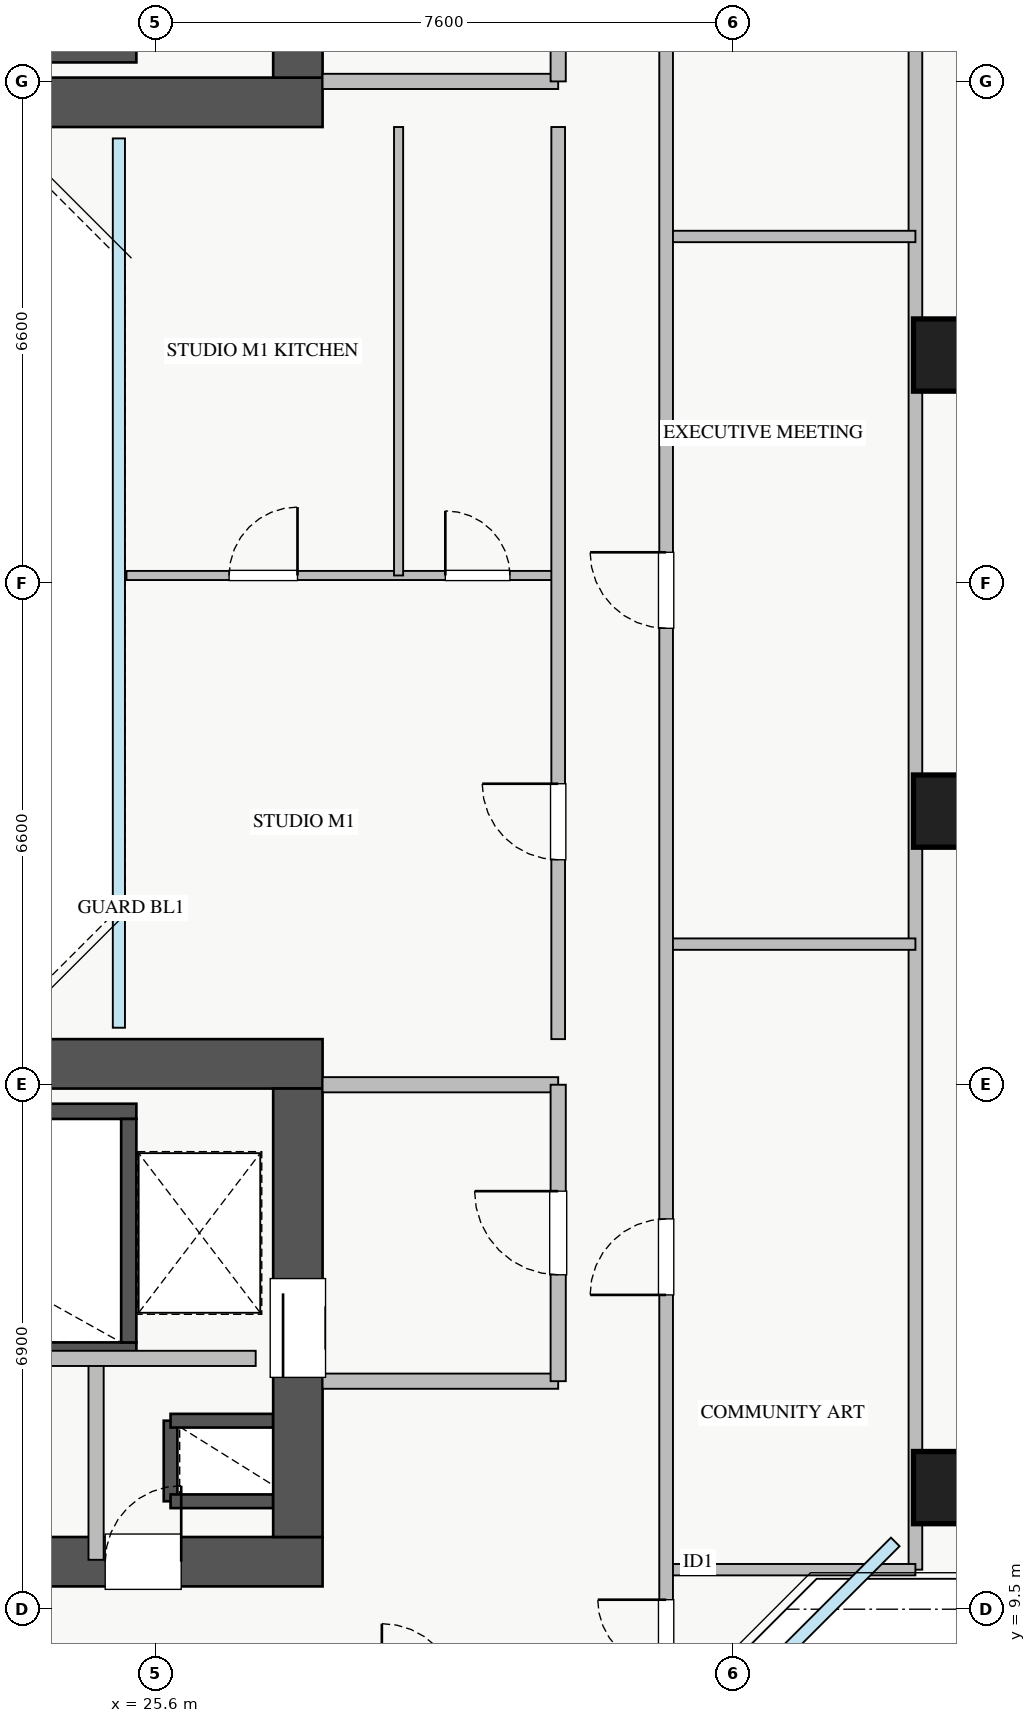
"""IFC4 building model, lengths in metres.
Left out: names, types, materials, properties, quantities, classifications, styles, units other than length and angle.
Written with IfcOpenShell. Run it as: python <this file> out.ifc"""

import sys

from ifc_helpers import new_model, si_unit, direction, frame, frame_2d, origin, origin_2d, place, context, subcontext, project, spatial, rectangle, extrude, source, transform, mapped, element, fill, save


model = new_model("IFC4")
c1 = context("Model", 3, precision=1e-05, world=origin(), true_north=direction((0.0, 1.0)))
c2 = subcontext(c1, "Body", "Model", "MODEL_VIEW")
j1 = project(units=[si_unit("LENGTHUNIT", "METRE"), si_unit("PLANEANGLEUNIT", "RADIAN")], contexts=[c1])
p1 = place(None, origin())
s1 = spatial("IfcSite", under=j1, at=p1, CompositionType="ELEMENT")
p2 = place(p1, origin())
s2 = spatial("IfcBuilding", under=s1, at=p2, CompositionType="ELEMENT")
p3 = place(p2, frame((0.0, 0.0, 176.25)))
s3 = spatial("IfcBuildingStorey", under=s2, at=p3, CompositionType="ELEMENT", Elevation=176.25)
p4 = place(p3, frame((25.8, 10.92, 0.0), z_axis=(0.0, 0.0, 1.0), x_axis=(0.0, 1.0, 0.0)))
e1 = element("IfcWall", 1, at=p4, inside=s3, PredefinedType="SHEAR", context=c2, shape_type="SweptSolid", body=[
    extrude(rectangle(XDim=1.06, YDim=0.18, at=frame_2d((0.53, 0.0))), origin(), (0.0, 0.0, 1.0), 3.07),
])
for number, where, z_axis, x_axis in (
    (2, (25.8, 11.98, 0.0), (0.0, 0.0, 1.0), (1.0, 0.0, 0.0)),
    (3, (25.8, 10.92, 0.0), (0.0, 0.0, 1.0), (1.0, 0.0, 0.0)),
):
    element("IfcWall", number, at=place(p3, frame(where, z_axis=z_axis, x_axis=x_axis)), inside=s3, PredefinedType="SHEAR", context=c2, shape_type="SweptSolid", body=[
        extrude(rectangle(XDim=1.35, YDim=0.18, at=frame_2d((0.675, 0.0))), origin(), (0.0, 0.0, 1.0), 3.07),
    ])
p5 = place(p3, frame((18.2, 29.95, 0.0), z_axis=(0.0, 0.0, 1.0), x_axis=(1.0, 0.0, 0.0)))
e4 = element("IfcWall", 4, at=p5, inside=s3, PredefinedType="SHEAR", context=c2, shape_type="SweptSolid", body=[
    extrude(rectangle(XDim=7.15, YDim=0.2, at=frame_2d((3.575, 0.0))), origin(), (0.0, 0.0, 1.0), 3.25),
])
p6 = place(p3, frame((18.2, 12.91, 0.0), z_axis=(0.0, 0.0, 1.0), x_axis=(1.0, 0.0, 0.0)))
e5 = element("IfcWall", 5, at=p6, inside=s3, PredefinedType="SHEAR", context=c2, shape_type="SweptSolid", body=[
    extrude(rectangle(XDim=7.15, YDim=0.2, at=frame_2d((3.575, 0.0))), origin(), (0.0, 0.0, 1.0), 3.25),
])
p7 = place(p6, frame((0.35, 0.0, 0.0)))
e6 = element("IfcOpeningElement", 6, at=p7, cuts=e5, PredefinedType="OPENING", context=c2, shape_type="SweptSolid", body=[
    extrude(rectangle(XDim=1.1, YDim=2.05, at=frame_2d((0.55, 1.025))), frame((0.0, 0.11, 0.0), z_axis=(0.0, -1.0, 0.0), x_axis=(1.0, 0.0, 0.0)), (0.0, 0.0, 1.0), 0.22),
])
p8 = place(p3, frame((18.2, 16.05, 0.0), z_axis=(0.0, 0.0, 1.0), x_axis=(1.0, 0.0, 0.0)))
e7 = element("IfcWall", 7, at=p8, inside=s3, PredefinedType="SHEAR", context=c2, shape_type="SweptSolid", body=[
    extrude(rectangle(XDim=7.15, YDim=0.2, at=frame_2d((3.575, 0.0))), origin(), (0.0, 0.0, 1.0), 3.25),
])
p9 = place(p3, frame((25.25, 13.01, 0.0), z_axis=(0.0, 0.0, 1.0), x_axis=(0.0, 1.0, 0.0)))
e8 = element("IfcWall", 8, at=p9, inside=s3, PredefinedType="SHEAR", context=c2, shape_type="SweptSolid", body=[
    extrude(rectangle(XDim=2.94, YDim=0.2, at=frame_2d((1.47, 0.0))), origin(), (0.0, 0.0, 1.0), 3.25),
])
p10 = place(p3, frame((10.2, 29.325, 0.0), z_axis=(0.0, 0.0, 1.0), x_axis=(1.0, 0.0, 0.0)))
e9 = element("IfcWall", 9, at=p10, inside=s3, PredefinedType="SHEAR", context=c2, shape_type="SweptSolid", body=[
    extrude(rectangle(XDim=17.6, YDim=0.65, at=frame_2d((8.8, 0.0))), origin(), (0.0, 0.0, 1.0), 3.25),
])
p11 = place(p3, frame((27.475, 29.65, 0.0), z_axis=(0.0, 0.0, 1.0), x_axis=(0.0, 1.0, 0.0)))
e10 = element("IfcWall", 10, at=p11, inside=s3, PredefinedType="SHEAR", context=c2, shape_type="SweptSolid", body=[
    extrude(rectangle(XDim=5.9, YDim=0.65, at=frame_2d((2.95, 0.0))), origin(), (0.0, 0.0, 1.0), 3.25),
])
p12 = place(p11, frame((1.1, 0.0, 0.0)))
e11 = element("IfcOpeningElement", 11, at=p12, cuts=e10, PredefinedType="OPENING", context=c2, shape_type="SweptSolid", body=[
    extrude(rectangle(XDim=1.3, YDim=2.05, at=frame_2d((0.65, 1.025))), frame((0.0, 0.335, 0.0), z_axis=(0.0, -1.0, 0.0), x_axis=(1.0, 0.0, 0.0)), (0.0, 0.0, 1.0), 0.67),
])
p13 = place(p3, frame((10.2, 10.125, 0.0), z_axis=(0.0, 0.0, 1.0), x_axis=(1.0, 0.0, 0.0)))
e12 = element("IfcWall", 12, at=p13, inside=s3, PredefinedType="SHEAR", context=c2, shape_type="SweptSolid", body=[
    extrude(rectangle(XDim=17.6, YDim=0.65, at=frame_2d((8.8, 0.0))), origin(), (0.0, 0.0, 1.0), 3.25),
])
p14 = place(p13, frame((1.15, 0.0, 0.0)))
e13 = element("IfcOpeningElement", 13, at=p14, cuts=e12, PredefinedType="OPENING", context=c2, shape_type="SweptSolid", body=[
    extrude(rectangle(XDim=1.1, YDim=2.05, at=frame_2d((0.55, 1.025))), frame((0.0, 0.335, 0.0), z_axis=(0.0, -1.0, 0.0), x_axis=(1.0, 0.0, 0.0)), (0.0, 0.0, 1.0), 0.67),
])
p15 = place(p13, frame((8.3, 0.0, 0.0)))
e14 = element("IfcOpeningElement", 14, at=p15, cuts=e12, PredefinedType="OPENING", context=c2, shape_type="SweptSolid", body=[
    extrude(rectangle(XDim=1.1, YDim=2.05, at=frame_2d((0.55, 1.025))), frame((0.0, 0.335, 0.0), z_axis=(0.0, -1.0, 0.0), x_axis=(1.0, 0.0, 0.0)), (0.0, 0.0, 1.0), 0.67),
])
p16 = place(p13, frame((4.9, 0.0, 0.0)))
e15 = element("IfcOpeningElement", 15, at=p16, cuts=e12, PredefinedType="OPENING", context=c2, shape_type="SweptSolid", body=[
    extrude(rectangle(XDim=1.1, YDim=2.05, at=frame_2d((0.55, 1.025))), frame((0.0, 0.335, 0.0), z_axis=(0.0, -1.0, 0.0), x_axis=(1.0, 0.0, 0.0)), (0.0, 0.0, 1.0), 0.67),
])
p17 = place(p13, frame((14.74, 0.0, 0.0)))
e16 = element("IfcOpeningElement", 16, at=p17, cuts=e12, PredefinedType="OPENING", context=c2, shape_type="SweptSolid", body=[
    extrude(rectangle(XDim=1.0, YDim=2.05, at=frame_2d((0.5, 1.025))), frame((0.0, 0.335, 0.0), z_axis=(0.0, -1.0, 0.0), x_axis=(1.0, 0.0, 0.0)), (0.0, 0.0, 1.0), 0.67),
])
p18 = place(p13, frame((11.67, 0.0, 0.0)))
e17 = element("IfcOpeningElement", 17, at=p18, cuts=e12, PredefinedType="OPENING", context=c2, shape_type="SweptSolid", body=[
    extrude(rectangle(XDim=1.0, YDim=2.05, at=frame_2d((0.5, 1.025))), frame((0.0, 0.335, 0.0), z_axis=(0.0, -1.0, 0.0), x_axis=(1.0, 0.0, 0.0)), (0.0, 0.0, 1.0), 0.67),
])
p19 = place(p3, frame((10.2, 16.675, 0.0), z_axis=(0.0, 0.0, 1.0), x_axis=(1.0, 0.0, 0.0)))
e18 = element("IfcWall", 18, at=p19, inside=s3, PredefinedType="SHEAR", context=c2, shape_type="SweptSolid", body=[
    extrude(rectangle(XDim=17.6, YDim=0.65, at=frame_2d((8.8, 0.0))), origin(), (0.0, 0.0, 1.0), 3.25),
])
p20 = place(p3, frame((27.475, 10.45, 0.0), z_axis=(0.0, 0.0, 1.0), x_axis=(0.0, 1.0, 0.0)))
e19 = element("IfcWall", 19, at=p20, inside=s3, PredefinedType="SHEAR", context=c2, shape_type="SweptSolid", body=[
    extrude(rectangle(XDim=5.9, YDim=0.65, at=frame_2d((2.95, 0.0))), origin(), (0.0, 0.0, 1.0), 3.25),
])
p21 = place(p20, frame((2.1, 0.0, 0.0)))
e20 = element("IfcOpeningElement", 20, at=p21, cuts=e19, PredefinedType="OPENING", context=c2, shape_type="SweptSolid", body=[
    extrude(rectangle(XDim=1.3, YDim=2.05, at=frame_2d((0.65, 1.025))), frame((0.0, 0.335, 0.0), z_axis=(0.0, -1.0, 0.0), x_axis=(1.0, 0.0, 0.0)), (0.0, 0.0, 1.0), 0.67),
])
m1 = source(origin(), c2, "Body", "SweptSolid", [
    extrude(rectangle(XDim=0.95, YDim=0.95, at=origin_2d()), origin(), (0.0, 0.0, 1.0), 3.25),
])
for number, where, z_axis, x_axis in (
    (21, (36.05, 11.1, 0.0), (0.0, 0.0, 1.0), (1.0, 0.0, 0.0)),
    (22, (36.05, 20.0, 0.0), (0.0, 0.0, 1.0), (1.0, 0.0, 0.0)),
    (23, (36.05, 26.0, 0.0), (0.0, 0.0, 1.0), (1.0, 0.0, 0.0)),
):
    element("IfcColumn", number, at=place(p3, frame(where, z_axis=z_axis, x_axis=x_axis)), inside=s3, PredefinedType="COLUMN", context=c2, shape_type="MappedRepresentation", body=[
        mapped(m1, transform((0.0, 0.0, 0.0), x_axis=(1.0, 0.0, 0.0), y_axis=(0.0, 1.0, 0.0), z_axis=(0.0, 0.0, 1.0), scale=1.0)),
    ])
p22 = place(p3, frame((27.8, 29.6, 0.0), z_axis=(0.0, 0.0, 1.0), x_axis=(1.0, 0.0, 0.0)))
e24 = element("IfcWall", 24, at=p22, inside=s3, PredefinedType="PARTITIONING", context=c2, shape_type="SweptSolid", body=[
    extrude(rectangle(XDim=3.1, YDim=0.2, at=frame_2d((1.55, 0.0))), origin(), (0.0, 0.0, 1.0), 3.07),
])
p23 = place(p3, frame((30.9, 29.6, 0.0), z_axis=(0.0, 0.0, 1.0), x_axis=(0.0, 1.0, 0.0)))
e25 = element("IfcWall", 25, at=p23, inside=s3, PredefinedType="PARTITIONING", context=c2, shape_type="SweptSolid", body=[
    extrude(rectangle(XDim=3.9, YDim=0.2, at=frame_2d((1.95, 0.0))), origin(), (0.0, 0.0, 1.0), 3.07),
])
p24 = place(p23, frame((1.4, 0.0, 0.0)))
e26 = element("IfcOpeningElement", 26, at=p24, cuts=e25, PredefinedType="OPENING", context=c2, shape_type="SweptSolid", body=[
    extrude(rectangle(XDim=1.1, YDim=2.05, at=frame_2d((0.55, 1.025))), frame((0.0, 0.11, 0.0), z_axis=(0.0, -1.0, 0.0), x_axis=(1.0, 0.0, 0.0)), (0.0, 0.0, 1.0), 0.22),
])
for number, where, z_axis, x_axis in (
    (27, (27.8, 16.4, 0.0), (0.0, 0.0, 1.0), (1.0, 0.0, 0.0)),
    (28, (27.8, 12.5, 0.0), (0.0, 0.0, 1.0), (1.0, 0.0, 0.0)),
):
    element("IfcWall", number, at=place(p3, frame(where, z_axis=z_axis, x_axis=x_axis)), inside=s3, PredefinedType="PARTITIONING", context=c2, shape_type="SweptSolid", body=[
        extrude(rectangle(XDim=3.1, YDim=0.2, at=frame_2d((1.55, 0.0))), origin(), (0.0, 0.0, 1.0), 3.07),
    ])
p25 = place(p3, frame((30.9, 12.5, 0.0), z_axis=(0.0, 0.0, 1.0), x_axis=(0.0, 1.0, 0.0)))
e29 = element("IfcWall", 29, at=p25, inside=s3, PredefinedType="PARTITIONING", context=c2, shape_type="SweptSolid", body=[
    extrude(rectangle(XDim=3.9, YDim=0.2, at=frame_2d((1.95, 0.0))), origin(), (0.0, 0.0, 1.0), 3.07),
])
p26 = place(p25, frame((1.4, 0.0, 0.0)))
e30 = element("IfcOpeningElement", 30, at=p26, cuts=e29, PredefinedType="OPENING", context=c2, shape_type="SweptSolid", body=[
    extrude(rectangle(XDim=1.1, YDim=2.05, at=frame_2d((0.55, 1.025))), frame((0.0, 0.11, 0.0), z_axis=(0.0, -1.0, 0.0), x_axis=(1.0, 0.0, 0.0)), (0.0, 0.0, 1.0), 0.22),
])
p27 = place(p3, frame((24.82, 10.15, 0.0), z_axis=(0.0, 0.0, 1.0), x_axis=(0.0, 1.0, 0.0)))
e31 = element("IfcWall", 31, at=p27, inside=s3, PredefinedType="PARTITIONING", context=c2, shape_type="SweptSolid", body=[
    extrude(rectangle(XDim=2.65, YDim=0.2, at=frame_2d((1.325, 0.0))), origin(), (0.0, 0.0, 1.0), 3.07),
])
p28 = place(p3, frame((21.75, 12.8, 0.0), z_axis=(0.0, 0.0, 1.0), x_axis=(1.0, 0.0, 0.0)))
e32 = element("IfcWall", 32, at=p28, inside=s3, PredefinedType="PARTITIONING", context=c2, shape_type="SweptSolid", body=[
    extrude(rectangle(XDim=5.17, YDim=0.2, at=frame_2d((2.585, 0.0))), origin(), (0.0, 0.0, 1.0), 3.07),
])
p29 = place(p3, frame((35.6, 10.02, 0.0), z_axis=(0.0, 0.0, 1.0), x_axis=(0.0, 1.0, 0.0)))
e33 = element("IfcWall", 33, at=p29, inside=s3, PredefinedType="PARTITIONING", context=c2, shape_type="SweptSolid", body=[
    extrude(rectangle(XDim=25.96, YDim=0.18, at=frame_2d((12.98, 0.0))), origin(), (0.0, 0.0, 1.0), 3.07),
])
p30 = place(p3, frame((32.32, 10.02, 0.0), z_axis=(0.0, 0.0, 1.0), x_axis=(1.0, 0.0, 0.0)))
e34 = element("IfcWall", 34, at=p30, inside=s3, PredefinedType="PARTITIONING", context=c2, shape_type="SweptSolid", body=[
    extrude(rectangle(XDim=3.28, YDim=0.15, at=frame_2d((1.64, 0.0))), origin(), (0.0, 0.0, 1.0), 3.07),
])
p31 = place(p3, frame((32.32, 18.25, 0.0), z_axis=(0.0, 0.0, 1.0), x_axis=(1.0, 0.0, 0.0)))
e35 = element("IfcWall", 35, at=p31, inside=s3, PredefinedType="PARTITIONING", context=c2, shape_type="SweptSolid", body=[
    extrude(rectangle(XDim=3.28, YDim=0.15, at=frame_2d((1.64, 0.0))), origin(), (0.0, 0.0, 1.0), 2.715),
])
p32 = place(p3, frame((32.32, 27.56, 0.0), z_axis=(0.0, 0.0, 1.0), x_axis=(1.0, 0.0, 0.0)))
e36 = element("IfcWall", 36, at=p32, inside=s3, PredefinedType="PARTITIONING", context=c2, shape_type="SweptSolid", body=[
    extrude(rectangle(XDim=3.28, YDim=0.15, at=frame_2d((1.64, 0.0))), origin(), (0.0, 0.0, 1.0), 3.07),
])
p33 = place(p3, frame((32.32, 8.31, 0.0), z_axis=(0.0, 0.0, 1.0), x_axis=(0.0, 1.0, 0.0)))
e37 = element("IfcWall", 37, at=p33, inside=s3, PredefinedType="PARTITIONING", context=c2, shape_type="SweptSolid", body=[
    extrude(rectangle(XDim=29.34, YDim=0.18, at=frame_2d((14.67, 0.0))), origin(), (0.0, 0.0, 1.0), 3.07),
])
p34 = place(p33, frame((28.045, 0.0, 0.0)))
e38 = element("IfcOpeningElement", 38, at=p34, cuts=e37, PredefinedType="OPENING", context=c2, shape_type="SweptSolid", body=[
    extrude(rectangle(XDim=0.9, YDim=2.05, at=frame_2d((0.45, 1.025))), frame((0.0, 0.1, 0.0), z_axis=(0.0, -1.0, 0.0), x_axis=(1.0, 0.0, 0.0)), (0.0, 0.0, 1.0), 0.2),
])
p35 = place(p33, frame((0.415, 0.0, 0.0)))
e39 = element("IfcOpeningElement", 39, at=p35, cuts=e37, PredefinedType="OPENING", context=c2, shape_type="SweptSolid", body=[
    extrude(rectangle(XDim=0.9, YDim=2.05, at=frame_2d((0.45, 1.025))), frame((0.0, 0.1, 0.0), z_axis=(0.0, -1.0, 0.0), x_axis=(1.0, 0.0, 0.0)), (0.0, 0.0, 1.0), 0.2),
])
p36 = place(p33, frame((5.325, 0.0, 0.0)))
e40 = element("IfcOpeningElement", 40, at=p36, cuts=e37, PredefinedType="OPENING", context=c2, shape_type="SweptSolid", body=[
    extrude(rectangle(XDim=1.0, YDim=2.05, at=frame_2d((0.5, 1.025))), frame((0.0, 0.1, 0.0), z_axis=(0.0, -1.0, 0.0), x_axis=(1.0, 0.0, 0.0)), (0.0, 0.0, 1.0), 0.2),
])
p37 = place(p33, frame((14.095, 0.0, 0.0)))
e41 = element("IfcOpeningElement", 41, at=p37, cuts=e37, PredefinedType="OPENING", context=c2, shape_type="SweptSolid", body=[
    extrude(rectangle(XDim=1.0, YDim=2.05, at=frame_2d((0.5, 1.025))), frame((0.0, 0.1, 0.0), z_axis=(0.0, -1.0, 0.0), x_axis=(1.0, 0.0, 0.0)), (0.0, 0.0, 1.0), 0.2),
])
p38 = place(p33, frame((22.96, 0.0, 0.0)))
e42 = element("IfcOpeningElement", 42, at=p38, cuts=e37, PredefinedType="OPENING", context=c2, shape_type="SweptSolid", body=[
    extrude(rectangle(XDim=1.0, YDim=2.05, at=frame_2d((0.5, 1.025))), frame((0.0, 0.1, 0.0), z_axis=(0.0, -1.0, 0.0), x_axis=(1.0, 0.0, 0.0)), (0.0, 0.0, 1.0), 0.2),
])
p39 = place(p3, frame((25.22, 23.1, 0.0), z_axis=(0.0, 0.0, 1.0), x_axis=(1.0, 0.0, 0.0)))
e43 = element("IfcWall", 43, at=p39, inside=s3, PredefinedType="PLUMBINGWALL", context=c2, shape_type="SweptSolid", body=[
    extrude(rectangle(XDim=5.68, YDim=0.12, at=frame_2d((2.84, 0.0))), origin(), (0.0, 0.0, 1.0), 3.07),
])
p40 = place(p39, frame((1.35, 0.0, 0.0)))
e44 = element("IfcOpeningElement", 44, at=p40, cuts=e43, PredefinedType="OPENING", context=c2, shape_type="SweptSolid", body=[
    extrude(rectangle(XDim=0.9, YDim=2.05, at=frame_2d((0.45, 1.025))), frame((0.0, 0.07, 0.0), z_axis=(0.0, -1.0, 0.0), x_axis=(1.0, 0.0, 0.0)), (0.0, 0.0, 1.0), 0.14),
])
p41 = place(p39, frame((4.195, 0.0, 0.0)))
e45 = element("IfcOpeningElement", 45, at=p41, cuts=e43, PredefinedType="OPENING", context=c2, shape_type="SweptSolid", body=[
    extrude(rectangle(XDim=0.85, YDim=2.05, at=frame_2d((0.425, 1.025))), frame((0.0, 0.07, 0.0), z_axis=(0.0, -1.0, 0.0), x_axis=(1.0, 0.0, 0.0)), (0.0, 0.0, 1.0), 0.14),
])
p42 = place(p3, frame((28.8, 23.1, 0.0), z_axis=(0.0, 0.0, 1.0), x_axis=(0.0, 1.0, 0.0)))
e46 = element("IfcWall", 46, at=p42, inside=s3, PredefinedType="PLUMBINGWALL", context=c2, shape_type="SweptSolid", body=[
    extrude(rectangle(XDim=5.9, YDim=0.12, at=frame_2d((2.95, 0.0))), origin(), (0.0, 0.0, 1.0), 3.07),
])
p43 = place(p3, frame((30.9, 17.0, 0.0), z_axis=(0.0, 0.0, 1.0), x_axis=(0.0, 1.0, 0.0)))
e47 = element("IfcWall", 47, at=p43, inside=s3, PredefinedType="PARTITIONING", context=c2, shape_type="SweptSolid", body=[
    extrude(rectangle(XDim=12.0, YDim=0.18, at=frame_2d((6.0, 0.0))), origin(), (0.0, 0.0, 1.0), 3.07),
])
p44 = place(p43, frame((2.36, 0.0, 0.0)))
e48 = element("IfcOpeningElement", 48, at=p44, cuts=e47, PredefinedType="OPENING", context=c2, shape_type="SweptSolid", body=[
    extrude(rectangle(XDim=1.0, YDim=2.05, at=frame_2d((0.5, 1.025))), frame((0.0, 0.1, 0.0), z_axis=(0.0, -1.0, 0.0), x_axis=(1.0, 0.0, 0.0)), (0.0, 0.0, 1.0), 0.2),
])
m2 = source(origin(), c2, "Body", "SweptSolid", [
    extrude(rectangle(XDim=1.3, YDim=2.05, at=frame_2d((0.65, 1.025))), frame((0.0, 0.025, 0.0), z_axis=(0.0, -1.0, 0.0), x_axis=(1.0, 0.0, 0.0)), (0.0, 0.0, 1.0), 0.05),
])
p45 = place(p21, origin())
e49 = element("IfcDoor", 49, at=p45, inside=s3, OperationType="SLIDING_TO_RIGHT", PredefinedType="DOOR", context=c2, shape_type="MappedRepresentation", body=[
    mapped(m2, transform((0.0, 0.0, 0.0), x_axis=(1.0, 0.0, 0.0), y_axis=(0.0, 1.0, 0.0), z_axis=(0.0, 0.0, 1.0), scale=1.0)),
])
fill(e20, e49)
m3 = source(origin(), c2, "Body", "SweptSolid", [
    extrude(rectangle(XDim=1.0, YDim=2.05, at=frame_2d((0.5, 1.025))), frame((0.0, 0.025, 0.0), z_axis=(0.0, -1.0, 0.0), x_axis=(1.0, 0.0, 0.0)), (0.0, 0.0, 1.0), 0.05),
])
p46 = place(p17, origin())
e50 = element("IfcDoor", 50, at=p46, inside=s3, OperationType="SINGLE_SWING_RIGHT", PredefinedType="DOOR", context=c2, shape_type="MappedRepresentation", body=[
    mapped(m3, transform((0.0, 0.0, 0.0), x_axis=(1.0, 0.0, 0.0), y_axis=(0.0, 1.0, 0.0), z_axis=(0.0, 0.0, 1.0), scale=1.0)),
])
fill(e16, e50)
m4 = source(origin(), c2, "Body", "SweptSolid", [
    extrude(rectangle(XDim=1.1, YDim=2.05, at=frame_2d((0.55, 1.025))), frame((0.0, 0.025, 0.0), z_axis=(0.0, -1.0, 0.0), x_axis=(1.0, 0.0, 0.0)), (0.0, 0.0, 1.0), 0.05),
])
p47 = place(p26, origin())
e51 = element("IfcDoor", 51, at=p47, inside=s3, OperationType="SINGLE_SWING_RIGHT", PredefinedType="DOOR", context=c2, shape_type="MappedRepresentation", body=[
    mapped(m4, transform((0.0, 0.0, 0.0), x_axis=(1.0, 0.0, 0.0), y_axis=(0.0, 1.0, 0.0), z_axis=(0.0, 0.0, 1.0), scale=1.0)),
])
fill(e30, e51)
m5 = source(origin(), c2, "Body", "SweptSolid", [
    extrude(rectangle(XDim=0.9, YDim=2.05, at=frame_2d((0.45, 1.025))), frame((0.0, 0.025, 0.0), z_axis=(0.0, -1.0, 0.0), x_axis=(1.0, 0.0, 0.0)), (0.0, 0.0, 1.0), 0.05),
])
p48 = place(p35, origin())
e52 = element("IfcDoor", 52, at=p48, inside=s3, OperationType="SINGLE_SWING_RIGHT", PredefinedType="DOOR", context=c2, shape_type="MappedRepresentation", body=[
    mapped(m5, transform((0.0, 0.0, 0.0), x_axis=(1.0, 0.0, 0.0), y_axis=(0.0, 1.0, 0.0), z_axis=(0.0, 0.0, 1.0), scale=1.0)),
])
fill(e39, e52)
p49 = place(p36, origin())
e53 = element("IfcDoor", 53, at=p49, inside=s3, OperationType="SINGLE_SWING_LEFT", PredefinedType="DOOR", context=c2, shape_type="MappedRepresentation", body=[
    mapped(m3, transform((0.0, 0.0, 0.0), x_axis=(1.0, 0.0, 0.0), y_axis=(0.0, 1.0, 0.0), z_axis=(0.0, 0.0, 1.0), scale=1.0)),
])
fill(e40, e53)
p50 = place(p37, origin())
e54 = element("IfcDoor", 54, at=p50, inside=s3, OperationType="SINGLE_SWING_RIGHT", PredefinedType="DOOR", context=c2, shape_type="MappedRepresentation", body=[
    mapped(m3, transform((0.0, 0.0, 0.0), x_axis=(1.0, 0.0, 0.0), y_axis=(0.0, 1.0, 0.0), z_axis=(0.0, 0.0, 1.0), scale=1.0)),
])
fill(e41, e54)
p51 = place(p40, origin())
e55 = element("IfcDoor", 55, at=p51, inside=s3, OperationType="SINGLE_SWING_RIGHT", PredefinedType="DOOR", context=c2, shape_type="MappedRepresentation", body=[
    mapped(m5, transform((0.0, 0.0, 0.0), x_axis=(1.0, 0.0, 0.0), y_axis=(0.0, 1.0, 0.0), z_axis=(0.0, 0.0, 1.0), scale=1.0)),
])
fill(e44, e55)
m6 = source(origin(), c2, "Body", "SweptSolid", [
    extrude(rectangle(XDim=0.85, YDim=2.05, at=frame_2d((0.425, 1.025))), frame((0.0, 0.025, 0.0), z_axis=(0.0, -1.0, 0.0), x_axis=(1.0, 0.0, 0.0)), (0.0, 0.0, 1.0), 0.05),
])
p52 = place(p41, origin())
e56 = element("IfcDoor", 56, at=p52, inside=s3, OperationType="SINGLE_SWING_LEFT", PredefinedType="DOOR", context=c2, shape_type="MappedRepresentation", body=[
    mapped(m6, transform((0.0, 0.0, 0.0), x_axis=(1.0, 0.0, 0.0), y_axis=(0.0, 1.0, 0.0), z_axis=(0.0, 0.0, 1.0), scale=1.0)),
])
fill(e45, e56)
p53 = place(p44, origin())
e57 = element("IfcDoor", 57, at=p53, inside=s3, OperationType="SINGLE_SWING_RIGHT", PredefinedType="DOOR", context=c2, shape_type="MappedRepresentation", body=[
    mapped(m3, transform((0.0, 0.0, 0.0), x_axis=(1.0, 0.0, 0.0), y_axis=(0.0, 1.0, 0.0), z_axis=(0.0, 0.0, 1.0), scale=1.0)),
])
fill(e48, e57)
save(model, sys.argv[1])
